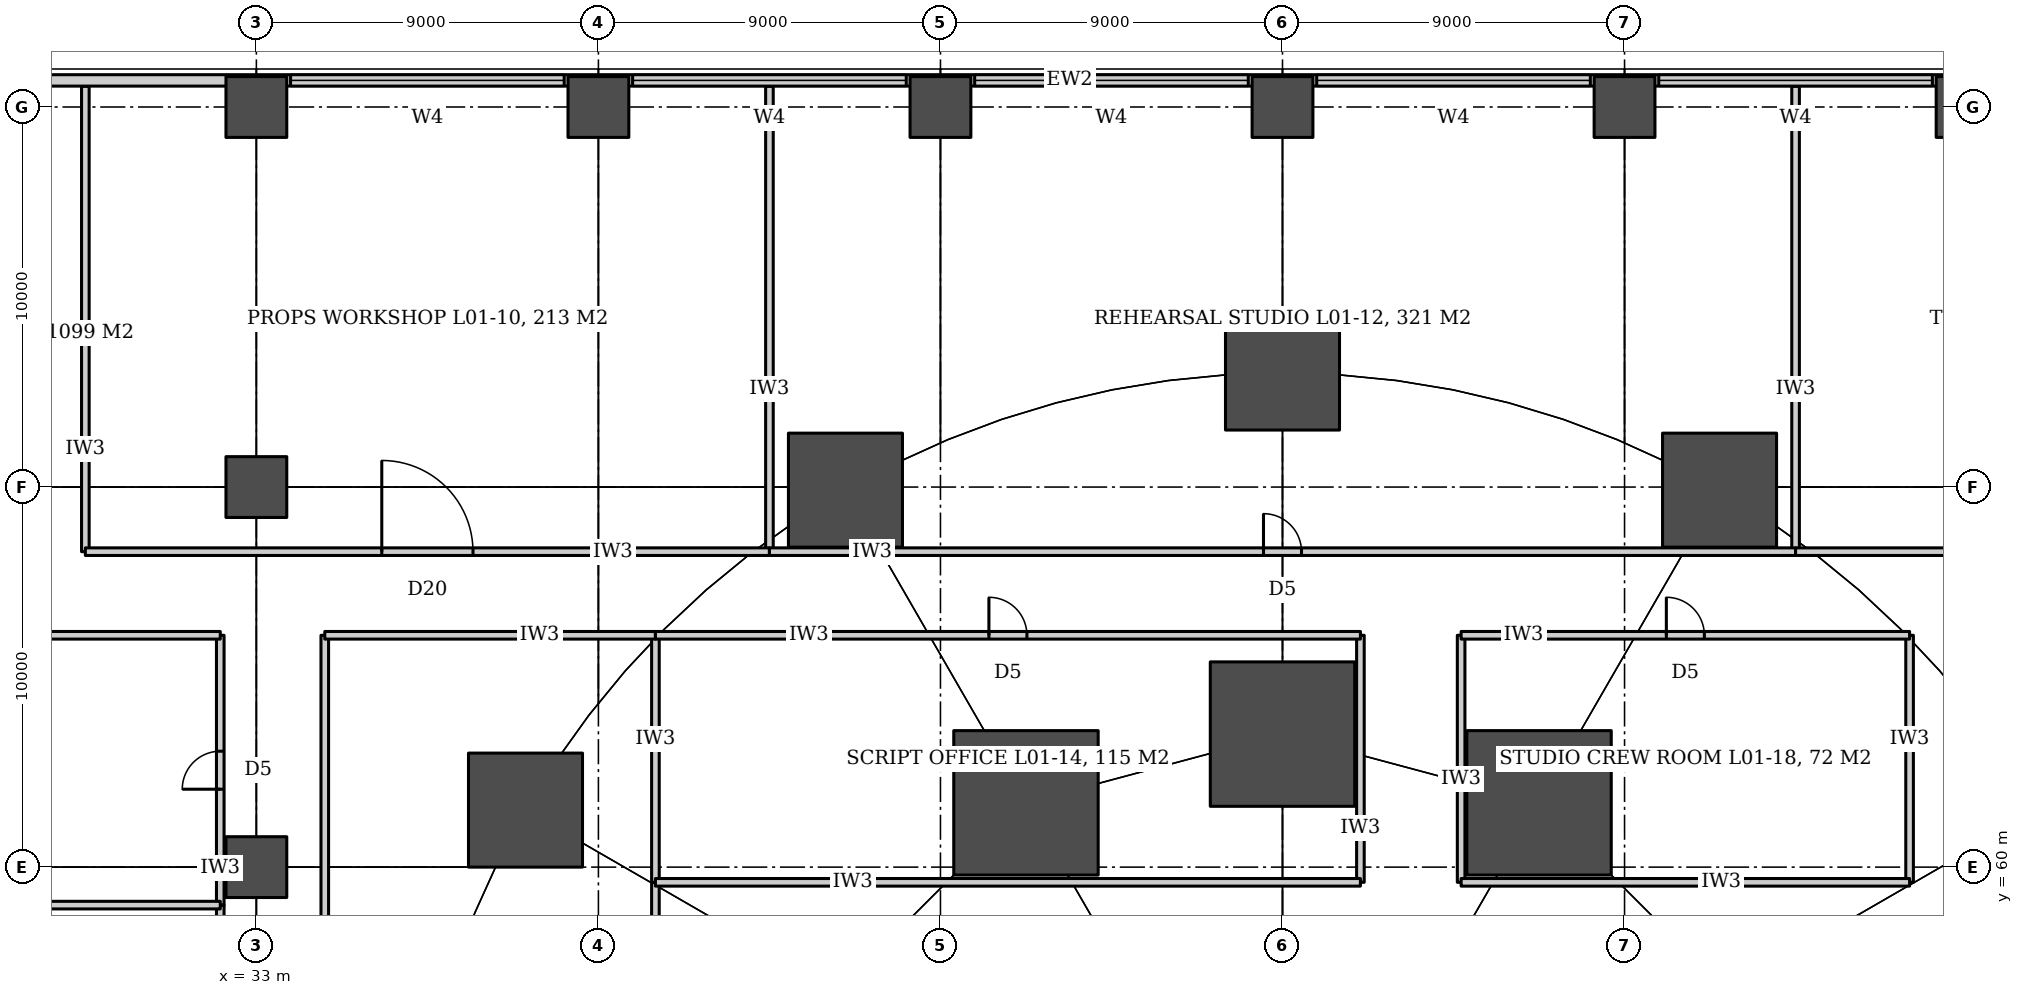
"""IFC4 building model, lengths in metres.
Left out: names, types, materials, properties, quantities, classifications, styles, units other than length and angle.
Written with IfcOpenShell. Run it as: python <this file> out.ifc"""

import sys

from ifc_helpers import new_model, si_unit, direction, frame, frame_2d, origin, origin_2d, place, context, subcontext, project, spatial, rectangle, circle, extrude, element, fill, save


model = new_model("IFC4")
c1 = context("Model", 3, precision=1e-05, world=origin(), true_north=direction((0.0, 1.0)))
c2 = subcontext(c1, "Body", "Model", "MODEL_VIEW")
j1 = project(units=[si_unit("LENGTHUNIT", "METRE"), si_unit("PLANEANGLEUNIT", "RADIAN")], contexts=[c1])
p1 = place(None, origin())
s1 = spatial("IfcSite", under=j1, at=p1, CompositionType="ELEMENT")
p2 = place(p1, origin())
s2 = spatial("IfcBuilding", under=s1, at=p2, CompositionType="ELEMENT")
p3 = place(p2, frame((0.0, 0.0, 6.0)))
s3 = spatial("IfcBuildingStorey", under=s2, at=p3, CompositionType="ELEMENT", Elevation=6.0)
for number, where, z_axis, x_axis in (
    (1, (33.0, 60.0, 0.0), (0.0, 0.0, 1.0), (1.0, 0.0, 0.0)),
    (2, (33.0, 70.0, 0.0), (0.0, 0.0, 1.0), (1.0, 0.0, 0.0)),
    (3, (33.0, 80.0, 0.0), (0.0, 0.0, 1.0), (1.0, 0.0, 0.0)),
    (4, (42.0, 80.0, 0.0), (0.0, 0.0, 1.0), (1.0, 0.0, 0.0)),
    (5, (51.0, 80.0, 0.0), (0.0, 0.0, 1.0), (1.0, 0.0, 0.0)),
    (6, (60.0, 80.0, 0.0), (0.0, 0.0, 1.0), (1.0, 0.0, 0.0)),
    (7, (69.0, 80.0, 0.0), (0.0, 0.0, 1.0), (1.0, 0.0, 0.0)),
    (8, (78.0, 80.0, 0.0), (0.0, 0.0, 1.0), (1.0, 0.0, 0.0)),
):
    element("IfcColumn", number, at=place(p3, frame(where, z_axis=z_axis, x_axis=x_axis)), inside=s3, PredefinedType="COLUMN", context=c2, shape_type="SweptSolid", body=[
        extrude(rectangle(XDim=1.6, YDim=1.6, at=origin_2d()), origin(), (0.0, 0.0, 1.0), 9.0),
    ])
for number, where, z_axis, x_axis in (
    (9, (71.5, 69.919, 0.0), (0.0, 0.0, 1.0), (1.0, 0.0, 0.0)),
    (10, (60.0, 73.0, 0.0), (0.0, 0.0, 1.0), (1.0, 0.0, 0.0)),
    (11, (48.5, 69.919, 0.0), (0.0, 0.0, 1.0), (1.0, 0.0, 0.0)),
    (12, (40.081, 61.5, 0.0), (0.0, 0.0, 1.0), (1.0, 0.0, 0.0)),
):
    element("IfcColumn", number, at=place(p3, frame(where, z_axis=z_axis, x_axis=x_axis)), inside=s3, PredefinedType="COLUMN", context=c2, shape_type="SweptSolid", body=[
        extrude(circle(Radius=1.5, at=origin_2d()), origin(), (0.0, 0.0, 1.0), 9.0),
    ])
for number, where, z_axis, x_axis in (
    (13, (66.75, 61.691, 0.0), (0.0, 0.0, 1.0), (1.0, 0.0, 0.0)),
    (14, (60.0, 63.5, 0.0), (0.0, 0.0, 1.0), (1.0, 0.0, 0.0)),
    (15, (53.25, 61.691, 0.0), (0.0, 0.0, 1.0), (1.0, 0.0, 0.0)),
):
    element("IfcColumn", number, at=place(p3, frame(where, z_axis=z_axis, x_axis=x_axis)), inside=s3, PredefinedType="COLUMN", context=c2, shape_type="SweptSolid", body=[
        extrude(circle(Radius=1.9, at=origin_2d()), origin(), (0.0, 0.0, 1.0), 9.0),
    ])
p4 = place(p3, frame((28.5, 68.3, 0.0), z_axis=(0.0, 0.0, 1.0), x_axis=(0.0, 1.0, 0.0)))
e16 = element("IfcWall", 16, at=p4, inside=s3, PredefinedType="PARTITIONING", context=c2, shape_type="SweptSolid", body=[
    extrude(rectangle(XDim=12.245, YDim=0.2, at=frame_2d((6.123, 0.0))), origin(), (0.0, 0.0, 1.0), 6.68),
])
p5 = place(p3, frame((32.05, 41.0, 0.0), z_axis=(0.0, 0.0, 1.0), x_axis=(0.0, 1.0, 0.0)))
e17 = element("IfcWall", 17, at=p5, inside=s3, PredefinedType="PARTITIONING", context=c2, shape_type="SweptSolid", body=[
    extrude(rectangle(XDim=18.0, YDim=0.2, at=frame_2d((9.0, 0.0))), origin(), (0.0, 0.0, 1.0), 6.18),
])
p6 = place(p5, frame((8.1, 0.0, 0.0)))
e18 = element("IfcOpeningElement", 18, at=p6, cuts=e17, PredefinedType="OPENING", context=c2, shape_type="SweptSolid", body=[
    extrude(rectangle(XDim=1.8, YDim=2.7, at=frame_2d((0.9, 1.35))), frame((0.0, 0.11, 0.0), z_axis=(0.0, -1.0, 0.0), x_axis=(1.0, 0.0, 0.0)), (0.0, 0.0, 1.0), 0.22),
])
p7 = place(p3, frame((32.05, 59.0, 0.0), z_axis=(0.0, 0.0, 1.0), x_axis=(0.0, 1.0, 0.0)))
e19 = element("IfcWall", 19, at=p7, inside=s3, PredefinedType="PARTITIONING", context=c2, shape_type="SweptSolid", body=[
    extrude(rectangle(XDim=7.1, YDim=0.2, at=frame_2d((3.55, 0.0))), origin(), (0.0, 0.0, 1.0), 6.18),
])
p8 = place(p7, frame((3.05, 0.0, 0.0)))
e20 = element("IfcOpeningElement", 20, at=p8, cuts=e19, PredefinedType="OPENING", context=c2, shape_type="SweptSolid", body=[
    extrude(rectangle(XDim=1.0, YDim=2.1, at=frame_2d((0.5, 1.05))), frame((0.0, 0.11, 0.0), z_axis=(0.0, -1.0, 0.0), x_axis=(1.0, 0.0, 0.0)), (0.0, 0.0, 1.0), 0.22),
])
p9 = place(p3, frame((34.8, 48.35, 0.0), z_axis=(0.0, 0.0, 1.0), x_axis=(0.0, 1.0, 0.0)))
e21 = element("IfcWall", 21, at=p9, inside=s3, PredefinedType="PARTITIONING", context=c2, shape_type="SweptSolid", body=[
    extrude(rectangle(XDim=17.75, YDim=0.2, at=frame_2d((8.875, 0.0))), origin(), (0.0, 0.0, 1.0), 6.18),
])
p10 = place(p9, frame((8.375, 0.0, 0.0)))
e22 = element("IfcOpeningElement", 22, at=p10, cuts=e21, PredefinedType="OPENING", context=c2, shape_type="SweptSolid", body=[
    extrude(rectangle(XDim=1.0, YDim=2.1, at=frame_2d((0.5, 1.05))), frame((0.0, 0.11, 0.0), z_axis=(0.0, -1.0, 0.0), x_axis=(1.0, 0.0, 0.0)), (0.0, 0.0, 1.0), 0.22),
])
p11 = place(p3, frame((43.5, 48.35, 0.0), z_axis=(0.0, 0.0, 1.0), x_axis=(0.0, 1.0, 0.0)))
e23 = element("IfcWall", 23, at=p11, inside=s3, PredefinedType="PARTITIONING", context=c2, shape_type="SweptSolid", body=[
    extrude(rectangle(XDim=11.25, YDim=0.2, at=frame_2d((5.625, 0.0))), origin(), (0.0, 0.0, 1.0), 6.08),
])
p12 = place(p3, frame((43.5, 59.6, 0.0), z_axis=(0.0, 0.0, 1.0), x_axis=(0.0, 1.0, 0.0)))
e24 = element("IfcWall", 24, at=p12, inside=s3, PredefinedType="PARTITIONING", context=c2, shape_type="SweptSolid", body=[
    extrude(rectangle(XDim=6.5, YDim=0.2, at=frame_2d((3.25, 0.0))), origin(), (0.0, 0.0, 1.0), 6.08),
])
p13 = place(p3, frame((46.5, 68.3, 0.0), z_axis=(0.0, 0.0, 1.0), x_axis=(0.0, 1.0, 0.0)))
e25 = element("IfcWall", 25, at=p13, inside=s3, PredefinedType="PARTITIONING", context=c2, shape_type="SweptSolid", body=[
    extrude(rectangle(XDim=12.245, YDim=0.2, at=frame_2d((6.123, 0.0))), origin(), (0.0, 0.0, 1.0), 6.68),
])
p14 = place(p3, frame((62.05, 59.6, 0.0), z_axis=(0.0, 0.0, 1.0), x_axis=(0.0, 1.0, 0.0)))
e26 = element("IfcWall", 26, at=p14, inside=s3, PredefinedType="PARTITIONING", context=c2, shape_type="SweptSolid", body=[
    extrude(rectangle(XDim=6.5, YDim=0.2, at=frame_2d((3.25, 0.0))), origin(), (0.0, 0.0, 1.0), 6.08),
])
p15 = place(p3, frame((64.7, 59.6, 0.0), z_axis=(0.0, 0.0, 1.0), x_axis=(0.0, 1.0, 0.0)))
e27 = element("IfcWall", 27, at=p15, inside=s3, PredefinedType="PARTITIONING", context=c2, shape_type="SweptSolid", body=[
    extrude(rectangle(XDim=6.5, YDim=0.2, at=frame_2d((3.25, 0.0))), origin(), (0.0, 0.0, 1.0), 5.48),
])
p16 = place(p3, frame((73.5, 68.3, 0.0), z_axis=(0.0, 0.0, 1.0), x_axis=(0.0, 1.0, 0.0)))
e28 = element("IfcWall", 28, at=p16, inside=s3, PredefinedType="PARTITIONING", context=c2, shape_type="SweptSolid", body=[
    extrude(rectangle(XDim=12.245, YDim=0.2, at=frame_2d((6.123, 0.0))), origin(), (0.0, 0.0, 1.0), 6.68),
])
p17 = place(p3, frame((76.5, 59.6, 0.0), z_axis=(0.0, 0.0, 1.0), x_axis=(0.0, 1.0, 0.0)))
e29 = element("IfcWall", 29, at=p17, inside=s3, PredefinedType="PARTITIONING", context=c2, shape_type="SweptSolid", body=[
    extrude(rectangle(XDim=6.5, YDim=0.2, at=frame_2d((3.25, 0.0))), origin(), (0.0, 0.0, 1.0), 6.08),
])
p18 = place(p3, frame((14.455, 59.0, 0.0), z_axis=(0.0, 0.0, 1.0), x_axis=(1.0, 0.0, 0.0)))
e30 = element("IfcWall", 30, at=p18, inside=s3, PredefinedType="PARTITIONING", context=c2, shape_type="SweptSolid", body=[
    extrude(rectangle(XDim=17.595, YDim=0.2, at=frame_2d((8.797, 0.0))), origin(), (0.0, 0.0, 1.0), 6.68),
])
p19 = place(p3, frame((43.5, 59.6, 0.0), z_axis=(0.0, 0.0, 1.0), x_axis=(1.0, 0.0, 0.0)))
e31 = element("IfcWall", 31, at=p19, inside=s3, PredefinedType="PARTITIONING", context=c2, shape_type="SweptSolid", body=[
    extrude(rectangle(XDim=18.55, YDim=0.2, at=frame_2d((9.275, 0.0))), origin(), (0.0, 0.0, 1.0), 5.48),
])
p20 = place(p3, frame((64.7, 59.6, 0.0), z_axis=(0.0, 0.0, 1.0), x_axis=(1.0, 0.0, 0.0)))
e32 = element("IfcWall", 32, at=p20, inside=s3, PredefinedType="PARTITIONING", context=c2, shape_type="SweptSolid", body=[
    extrude(rectangle(XDim=11.8, YDim=0.2, at=frame_2d((5.9, 0.0))), origin(), (0.0, 0.0, 1.0), 5.48),
])
p21 = place(p3, frame((14.455, 66.1, 0.0), z_axis=(0.0, 0.0, 1.0), x_axis=(1.0, 0.0, 0.0)))
e33 = element("IfcWall", 33, at=p21, inside=s3, PredefinedType="PARTITIONING", context=c2, shape_type="SweptSolid", body=[
    extrude(rectangle(XDim=17.595, YDim=0.2, at=frame_2d((8.797, 0.0))), origin(), (0.0, 0.0, 1.0), 6.68),
])
p22 = place(p3, frame((34.8, 66.1, 0.0), z_axis=(0.0, 0.0, 1.0), x_axis=(1.0, 0.0, 0.0)))
e34 = element("IfcWall", 34, at=p22, inside=s3, PredefinedType="PARTITIONING", context=c2, shape_type="SweptSolid", body=[
    extrude(rectangle(XDim=8.7, YDim=0.2, at=frame_2d((4.35, 0.0))), origin(), (0.0, 0.0, 1.0), 6.68),
])
p23 = place(p3, frame((43.5, 66.1, 0.0), z_axis=(0.0, 0.0, 1.0), x_axis=(1.0, 0.0, 0.0)))
e35 = element("IfcWall", 35, at=p23, inside=s3, PredefinedType="PARTITIONING", context=c2, shape_type="SweptSolid", body=[
    extrude(rectangle(XDim=18.55, YDim=0.2, at=frame_2d((9.275, 0.0))), origin(), (0.0, 0.0, 1.0), 6.08),
])
p24 = place(p23, frame((8.775, 0.0, 0.0)))
e36 = element("IfcOpeningElement", 36, at=p24, cuts=e35, PredefinedType="OPENING", context=c2, shape_type="SweptSolid", body=[
    extrude(rectangle(XDim=1.0, YDim=2.1, at=frame_2d((0.5, 1.05))), frame((0.0, 0.11, 0.0), z_axis=(0.0, -1.0, 0.0), x_axis=(1.0, 0.0, 0.0)), (0.0, 0.0, 1.0), 0.22),
])
p25 = place(p3, frame((64.7, 66.1, 0.0), z_axis=(0.0, 0.0, 1.0), x_axis=(1.0, 0.0, 0.0)))
e37 = element("IfcWall", 37, at=p25, inside=s3, PredefinedType="PARTITIONING", context=c2, shape_type="SweptSolid", body=[
    extrude(rectangle(XDim=11.8, YDim=0.2, at=frame_2d((5.9, 0.0))), origin(), (0.0, 0.0, 1.0), 6.08),
])
p26 = place(p25, frame((5.4, 0.0, 0.0)))
e38 = element("IfcOpeningElement", 38, at=p26, cuts=e37, PredefinedType="OPENING", context=c2, shape_type="SweptSolid", body=[
    extrude(rectangle(XDim=1.0, YDim=2.1, at=frame_2d((0.5, 1.05))), frame((0.0, 0.11, 0.0), z_axis=(0.0, -1.0, 0.0), x_axis=(1.0, 0.0, 0.0)), (0.0, 0.0, 1.0), 0.22),
])
p27 = place(p3, frame((28.5, 68.3, 0.0), z_axis=(0.0, 0.0, 1.0), x_axis=(1.0, 0.0, 0.0)))
e39 = element("IfcWall", 39, at=p27, inside=s3, PredefinedType="PARTITIONING", context=c2, shape_type="SweptSolid", body=[
    extrude(rectangle(XDim=18.0, YDim=0.2, at=frame_2d((9.0, 0.0))), origin(), (0.0, 0.0, 1.0), 6.68),
])
p28 = place(p27, frame((7.8, 0.0, 0.0)))
e40 = element("IfcOpeningElement", 40, at=p28, cuts=e39, PredefinedType="OPENING", context=c2, shape_type="SweptSolid", body=[
    extrude(rectangle(XDim=2.4, YDim=2.7, at=frame_2d((1.2, 1.35))), frame((0.0, 0.11, 0.0), z_axis=(0.0, -1.0, 0.0), x_axis=(1.0, 0.0, 0.0)), (0.0, 0.0, 1.0), 0.22),
])
p29 = place(p3, frame((46.5, 68.3, 0.0), z_axis=(0.0, 0.0, 1.0), x_axis=(1.0, 0.0, 0.0)))
e41 = element("IfcWall", 41, at=p29, inside=s3, PredefinedType="PARTITIONING", context=c2, shape_type="SweptSolid", body=[
    extrude(rectangle(XDim=27.0, YDim=0.2, at=frame_2d((13.5, 0.0))), origin(), (0.0, 0.0, 1.0), 6.08),
])
p30 = place(p29, frame((13.0, 0.0, 0.0)))
e42 = element("IfcOpeningElement", 42, at=p30, cuts=e41, PredefinedType="OPENING", context=c2, shape_type="SweptSolid", body=[
    extrude(rectangle(XDim=1.0, YDim=2.1, at=frame_2d((0.5, 1.05))), frame((0.0, 0.11, 0.0), z_axis=(0.0, -1.0, 0.0), x_axis=(1.0, 0.0, 0.0)), (0.0, 0.0, 1.0), 0.22),
])
p31 = place(p3, frame((73.5, 68.3, 0.0), z_axis=(0.0, 0.0, 1.0), x_axis=(1.0, 0.0, 0.0)))
e43 = element("IfcWall", 43, at=p31, inside=s3, PredefinedType="PARTITIONING", context=c2, shape_type="SweptSolid", body=[
    extrude(rectangle(XDim=18.0, YDim=0.2, at=frame_2d((9.0, 0.0))), origin(), (0.0, 0.0, 1.0), 6.68),
])
p32 = place(p31, frame((7.8, 0.0, 0.0)))
e44 = element("IfcOpeningElement", 44, at=p32, cuts=e43, PredefinedType="OPENING", context=c2, shape_type="SweptSolid", body=[
    extrude(rectangle(XDim=2.4, YDim=2.7, at=frame_2d((1.2, 1.35))), frame((0.0, 0.11, 0.0), z_axis=(0.0, -1.0, 0.0), x_axis=(1.0, 0.0, 0.0)), (0.0, 0.0, 1.0), 0.22),
])
p33 = place(p3, frame((95.0, 80.7, 0.0), z_axis=(0.0, 0.0, 1.0), x_axis=(-1.0, 0.0, 0.0)))
e45 = element("IfcWall", 45, at=p33, inside=s3, PredefinedType="SOLIDWALL", context=c2, shape_type="SweptSolid", body=[
    extrude(rectangle(XDim=70.0, YDim=0.3, at=frame_2d((35.0, 0.0))), origin(), (0.0, 0.0, 1.0), 8.7),
])
p34 = place(p33, frame((53.9, 0.0, 6.6)))
e46 = element("IfcOpeningElement", 46, at=p34, cuts=e45, PredefinedType="OPENING", context=c2, shape_type="SweptSolid", body=[
    extrude(rectangle(XDim=7.2, YDim=1.2, at=frame_2d((3.6, 0.6))), frame((0.0, 0.16, 0.0), z_axis=(0.0, -1.0, 0.0), x_axis=(1.0, 0.0, 0.0)), (0.0, 0.0, 1.0), 0.32),
])
p35 = place(p33, frame((44.9, 0.0, 6.6)))
e47 = element("IfcOpeningElement", 47, at=p35, cuts=e45, PredefinedType="OPENING", context=c2, shape_type="SweptSolid", body=[
    extrude(rectangle(XDim=7.2, YDim=1.2, at=frame_2d((3.6, 0.6))), frame((0.0, 0.16, 0.0), z_axis=(0.0, -1.0, 0.0), x_axis=(1.0, 0.0, 0.0)), (0.0, 0.0, 1.0), 0.32),
])
p36 = place(p33, frame((35.9, 0.0, 6.6)))
e48 = element("IfcOpeningElement", 48, at=p36, cuts=e45, PredefinedType="OPENING", context=c2, shape_type="SweptSolid", body=[
    extrude(rectangle(XDim=7.2, YDim=1.2, at=frame_2d((3.6, 0.6))), frame((0.0, 0.16, 0.0), z_axis=(0.0, -1.0, 0.0), x_axis=(1.0, 0.0, 0.0)), (0.0, 0.0, 1.0), 0.32),
])
p37 = place(p33, frame((26.9, 0.0, 6.6)))
e49 = element("IfcOpeningElement", 49, at=p37, cuts=e45, PredefinedType="OPENING", context=c2, shape_type="SweptSolid", body=[
    extrude(rectangle(XDim=7.2, YDim=1.2, at=frame_2d((3.6, 0.6))), frame((0.0, 0.16, 0.0), z_axis=(0.0, -1.0, 0.0), x_axis=(1.0, 0.0, 0.0)), (0.0, 0.0, 1.0), 0.32),
])
p38 = place(p33, frame((17.9, 0.0, 6.6)))
e50 = element("IfcOpeningElement", 50, at=p38, cuts=e45, PredefinedType="OPENING", context=c2, shape_type="SweptSolid", body=[
    extrude(rectangle(XDim=7.2, YDim=1.2, at=frame_2d((3.6, 0.6))), frame((0.0, 0.16, 0.0), z_axis=(0.0, -1.0, 0.0), x_axis=(1.0, 0.0, 0.0)), (0.0, 0.0, 1.0), 0.32),
])
p39 = place(p33, frame((8.9, 0.0, 6.6)))
e51 = element("IfcOpeningElement", 51, at=p39, cuts=e45, PredefinedType="OPENING", context=c2, shape_type="SweptSolid", body=[
    extrude(rectangle(XDim=7.2, YDim=1.2, at=frame_2d((3.6, 0.6))), frame((0.0, 0.16, 0.0), z_axis=(0.0, -1.0, 0.0), x_axis=(1.0, 0.0, 0.0)), (0.0, 0.0, 1.0), 0.32),
])
p40 = place(p28, origin())
e52 = element("IfcDoor", 52, at=p40, inside=s3, OperationType="DOUBLE_DOOR_DOUBLE_SWING", PredefinedType="DOOR", context=c2, shape_type="SweptSolid", body=[
    extrude(rectangle(XDim=2.4, YDim=2.7, at=frame_2d((1.2, 1.35))), frame((0.0, 0.025, 0.0), z_axis=(0.0, -1.0, 0.0), x_axis=(1.0, 0.0, 0.0)), (0.0, 0.0, 1.0), 0.05),
])
fill(e40, e52)
p41 = place(p30, origin())
e53 = element("IfcDoor", 53, at=p41, inside=s3, OperationType="SINGLE_SWING_LEFT", PredefinedType="DOOR", context=c2, shape_type="SweptSolid", body=[
    extrude(rectangle(XDim=1.0, YDim=2.1, at=frame_2d((0.5, 1.05))), frame((0.0, 0.025, 0.0), z_axis=(0.0, -1.0, 0.0), x_axis=(1.0, 0.0, 0.0)), (0.0, 0.0, 1.0), 0.05),
])
fill(e42, e53)
p42 = place(p24, origin())
e54 = element("IfcDoor", 54, at=p42, inside=s3, OperationType="SINGLE_SWING_LEFT", PredefinedType="DOOR", context=c2, shape_type="SweptSolid", body=[
    extrude(rectangle(XDim=1.0, YDim=2.1, at=frame_2d((0.5, 1.05))), frame((0.0, 0.025, 0.0), z_axis=(0.0, -1.0, 0.0), x_axis=(1.0, 0.0, 0.0)), (0.0, 0.0, 1.0), 0.05),
])
fill(e36, e54)
p43 = place(p26, origin())
e55 = element("IfcDoor", 55, at=p43, inside=s3, OperationType="SINGLE_SWING_LEFT", PredefinedType="DOOR", context=c2, shape_type="SweptSolid", body=[
    extrude(rectangle(XDim=1.0, YDim=2.1, at=frame_2d((0.5, 1.05))), frame((0.0, 0.025, 0.0), z_axis=(0.0, -1.0, 0.0), x_axis=(1.0, 0.0, 0.0)), (0.0, 0.0, 1.0), 0.05),
])
fill(e38, e55)
p44 = place(p8, origin())
e56 = element("IfcDoor", 56, at=p44, inside=s3, OperationType="SINGLE_SWING_LEFT", PredefinedType="DOOR", context=c2, shape_type="SweptSolid", body=[
    extrude(rectangle(XDim=1.0, YDim=2.1, at=frame_2d((0.5, 1.05))), frame((0.0, 0.025, 0.0), z_axis=(0.0, -1.0, 0.0), x_axis=(1.0, 0.0, 0.0)), (0.0, 0.0, 1.0), 0.05),
])
fill(e20, e56)
p45 = place(p34, origin())
e57 = element("IfcWindow", 57, at=p45, inside=s3, PartitioningType="SINGLE_PANEL", PredefinedType="WINDOW", context=c2, shape_type="SweptSolid", body=[
    extrude(rectangle(XDim=7.2, YDim=1.2, at=frame_2d((3.6, 0.6))), frame((0.0, 0.03, 0.0), z_axis=(0.0, -1.0, 0.0), x_axis=(1.0, 0.0, 0.0)), (0.0, 0.0, 1.0), 0.06),
])
fill(e46, e57)
p46 = place(p35, origin())
e58 = element("IfcWindow", 58, at=p46, inside=s3, PartitioningType="SINGLE_PANEL", PredefinedType="WINDOW", context=c2, shape_type="SweptSolid", body=[
    extrude(rectangle(XDim=7.2, YDim=1.2, at=frame_2d((3.6, 0.6))), frame((0.0, 0.03, 0.0), z_axis=(0.0, -1.0, 0.0), x_axis=(1.0, 0.0, 0.0)), (0.0, 0.0, 1.0), 0.06),
])
fill(e47, e58)
p47 = place(p36, origin())
e59 = element("IfcWindow", 59, at=p47, inside=s3, PartitioningType="SINGLE_PANEL", PredefinedType="WINDOW", context=c2, shape_type="SweptSolid", body=[
    extrude(rectangle(XDim=7.2, YDim=1.2, at=frame_2d((3.6, 0.6))), frame((0.0, 0.03, 0.0), z_axis=(0.0, -1.0, 0.0), x_axis=(1.0, 0.0, 0.0)), (0.0, 0.0, 1.0), 0.06),
])
fill(e48, e59)
p48 = place(p37, origin())
e60 = element("IfcWindow", 60, at=p48, inside=s3, PartitioningType="SINGLE_PANEL", PredefinedType="WINDOW", context=c2, shape_type="SweptSolid", body=[
    extrude(rectangle(XDim=7.2, YDim=1.2, at=frame_2d((3.6, 0.6))), frame((0.0, 0.03, 0.0), z_axis=(0.0, -1.0, 0.0), x_axis=(1.0, 0.0, 0.0)), (0.0, 0.0, 1.0), 0.06),
])
fill(e49, e60)
p49 = place(p38, origin())
e61 = element("IfcWindow", 61, at=p49, inside=s3, PartitioningType="SINGLE_PANEL", PredefinedType="WINDOW", context=c2, shape_type="SweptSolid", body=[
    extrude(rectangle(XDim=7.2, YDim=1.2, at=frame_2d((3.6, 0.6))), frame((0.0, 0.03, 0.0), z_axis=(0.0, -1.0, 0.0), x_axis=(1.0, 0.0, 0.0)), (0.0, 0.0, 1.0), 0.06),
])
fill(e50, e61)
save(model, sys.argv[1])
